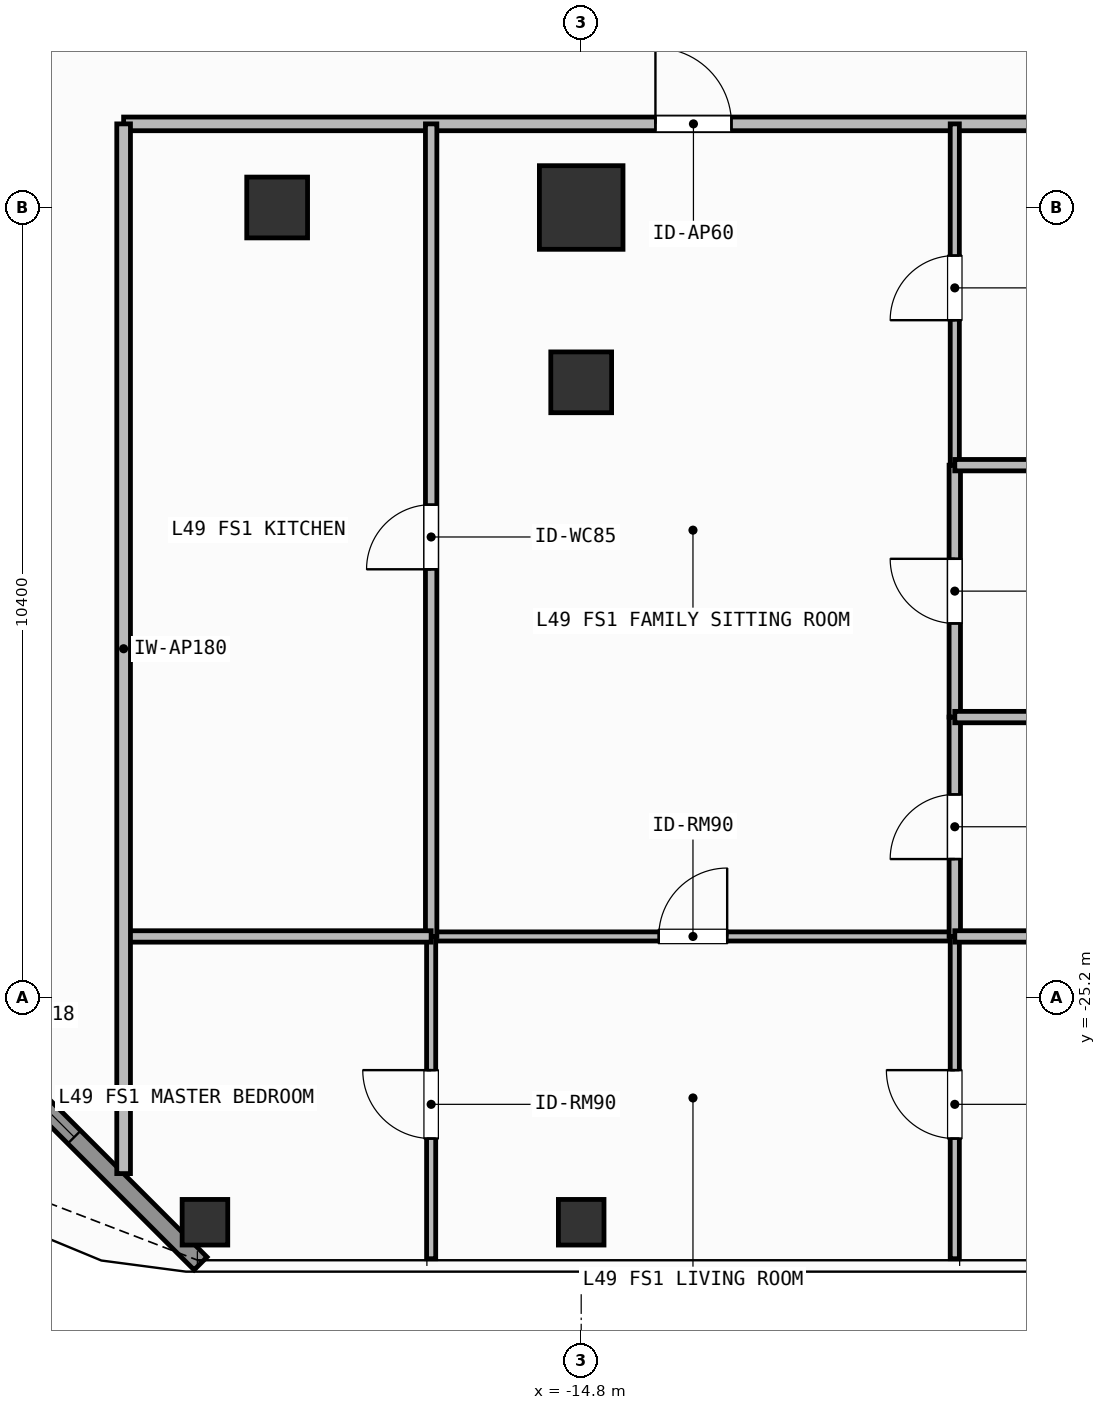
"""IFC4 building model, lengths in metres.
Left out: names, types, materials, properties, quantities, classifications, styles, units other than length and angle.
Written with IfcOpenShell. Run it as: python <this file> out.ifc"""

import sys

from ifc_helpers import new_model, si_unit, direction, frame, frame_2d, origin, origin_2d, place, context, subcontext, project, spatial, rectangle, hollow_rectangle, extrude, element, fill, save


model = new_model("IFC4")
c1 = context("Model", 3, precision=1e-05, world=origin(), true_north=direction((0.0, 1.0)))
c2 = subcontext(c1, "Body", "Model", "MODEL_VIEW")
j1 = project(units=[si_unit("LENGTHUNIT", "METRE"), si_unit("PLANEANGLEUNIT", "RADIAN")], contexts=[c1])
p1 = place(None, origin())
s1 = spatial("IfcSite", under=j1, at=p1, CompositionType="ELEMENT")
p2 = place(p1, origin())
s2 = spatial("IfcBuilding", under=s1, at=p2, CompositionType="ELEMENT")
p3 = place(p2, frame((0.0, 0.0, 199.2)))
s3 = spatial("IfcBuildingStorey", under=s2, at=p3, CompositionType="ELEMENT", Elevation=199.2)
p4 = place(p3, frame((-14.8, -14.8, 0.0), z_axis=(0.0, 0.0, 1.0), x_axis=(1.0, 0.0, 0.0)))
e1 = element("IfcColumn", 1, at=p4, inside=s3, PredefinedType="COLUMN", context=c2, shape_type="SweptSolid", body=[
    extrude(rectangle(XDim=1.1, YDim=1.1, at=origin_2d()), origin(), (0.0, 0.0, 1.0), 3.9),
])
for number, where, z_axis, x_axis in (
    (2, (-18.8, -14.8, 0.0), (0.0, 0.0, 1.0), (1.0, 0.0, 0.0)),
    (3, (-14.8, -17.1, 0.0), (0.0, 0.0, 1.0), (1.0, 0.0, 0.0)),
):
    element("IfcColumn", number, at=place(p3, frame(where, z_axis=z_axis, x_axis=x_axis)), inside=s3, PredefinedType="COLUMN", context=c2, shape_type="SweptSolid", body=[
        extrude(hollow_rectangle(XDim=0.8, YDim=0.8, WallThickness=0.036, at=origin_2d()), origin(), (0.0, 0.0, 1.0), 3.9),
    ])
for number, where, z_axis, x_axis in (
    (4, (-19.75, -28.15, 0.0), (0.0, 0.0, 1.0), (1.0, 0.0, 0.0)),
    (5, (-14.8, -28.15, 0.0), (0.0, 0.0, 1.0), (1.0, 0.0, 0.0)),
):
    element("IfcColumn", number, at=place(p3, frame(where, z_axis=z_axis, x_axis=x_axis)), inside=s3, PredefinedType="COLUMN", context=c2, shape_type="SweptSolid", body=[
        extrude(hollow_rectangle(XDim=0.6, YDim=0.6, WallThickness=0.028, at=origin_2d()), origin(), (0.0, 0.0, 1.0), 3.9),
    ])
p5 = place(p3, frame((-19.808, -28.692, 0.0), z_axis=(0.0, 0.0, 1.0), x_axis=(-0.707106781187, 0.707106781187, 0.0)))
e6 = element("IfcWall", 6, at=p5, inside=s3, PredefinedType="SOLIDWALL", context=c2, shape_type="SweptSolid", body=[
    extrude(rectangle(XDim=6.201, YDim=0.24, at=frame_2d((3.101, 0.0))), origin(), (0.0, 0.0, 1.0), 3.68),
])
p6 = place(p5, frame((2.351, 0.0, 0.8)))
e7 = element("IfcOpeningElement", 7, at=p6, cuts=e6, PredefinedType="OPENING", context=c2, shape_type="SweptSolid", body=[
    extrude(rectangle(XDim=1.5, YDim=1.85, at=frame_2d((0.75, 0.925))), frame((0.0, 0.13, 0.0), z_axis=(0.0, -1.0, 0.0), x_axis=(1.0, 0.0, 0.0)), (0.0, 0.0, 1.0), 0.26),
])
p7 = place(p3, frame((-20.82, -13.7, 0.0), z_axis=(0.0, 0.0, 1.0), x_axis=(1.0, 0.0, 0.0)))
e8 = element("IfcWall", 8, at=p7, inside=s3, PredefinedType="PARTITIONING", context=c2, shape_type="SweptSolid", body=[
    extrude(rectangle(XDim=15.893, YDim=0.18, at=frame_2d((7.947, 0.0))), origin(), (0.0, 0.0, 1.0), 3.68),
])
p8 = place(p7, frame((6.997, 0.0, 0.0)))
e9 = element("IfcOpeningElement", 9, at=p8, cuts=e8, PredefinedType="OPENING", context=c2, shape_type="SweptSolid", body=[
    extrude(rectangle(XDim=1.0, YDim=2.2, at=frame_2d((0.5, 1.1))), frame((0.0, 0.1, 0.0), z_axis=(0.0, -1.0, 0.0), x_axis=(1.0, 0.0, 0.0)), (0.0, 0.0, 1.0), 0.2),
])
p9 = place(p3, frame((-16.774, -24.39, 0.0), z_axis=(0.0, 0.0, 1.0), x_axis=(1.0, 0.0, 0.0)))
e10 = element("IfcWall", 10, at=p9, inside=s3, PredefinedType="PARTITIONING", context=c2, shape_type="SweptSolid", body=[
    extrude(rectangle(XDim=6.889, YDim=0.12, at=frame_2d((3.444, 0.0))), origin(), (0.0, 0.0, 1.0), 3.68),
])
p10 = place(p9, frame((2.994, 0.0, 0.0)))
e11 = element("IfcOpeningElement", 11, at=p10, cuts=e10, PredefinedType="OPENING", context=c2, shape_type="SweptSolid", body=[
    extrude(rectangle(XDim=0.9, YDim=2.1, at=frame_2d((0.45, 1.05))), frame((0.0, 0.07, 0.0), z_axis=(0.0, -1.0, 0.0), x_axis=(1.0, 0.0, 0.0)), (0.0, 0.0, 1.0), 0.14),
])
p11 = place(p3, frame((-16.774, -24.39, 0.0), z_axis=(0.0, 0.0, 1.0), x_axis=(0.0, 1.0, 0.0)))
e12 = element("IfcWall", 12, at=p11, inside=s3, PredefinedType="PARTITIONING", context=c2, shape_type="SweptSolid", body=[
    extrude(rectangle(XDim=10.69, YDim=0.15, at=frame_2d((5.345, 0.0))), origin(), (0.0, 0.0, 1.0), 3.68),
])
p12 = place(p11, frame((4.83, 0.0, 0.0)))
e13 = element("IfcOpeningElement", 13, at=p12, cuts=e12, PredefinedType="OPENING", context=c2, shape_type="SweptSolid", body=[
    extrude(rectangle(XDim=0.85, YDim=2.1, at=frame_2d((0.425, 1.05))), frame((0.0, 0.085, 0.0), z_axis=(0.0, -1.0, 0.0), x_axis=(1.0, 0.0, 0.0)), (0.0, 0.0, 1.0), 0.17),
])
p13 = place(p3, frame((-16.774, -28.63, 0.0), z_axis=(0.0, 0.0, 1.0), x_axis=(0.0, 1.0, 0.0)))
e14 = element("IfcWall", 14, at=p13, inside=s3, PredefinedType="PARTITIONING", context=c2, shape_type="SweptSolid", body=[
    extrude(rectangle(XDim=4.24, YDim=0.12, at=frame_2d((2.12, 0.0))), origin(), (0.0, 0.0, 1.0), 3.68),
])
p14 = place(p13, frame((1.581, 0.0, 0.0)))
e15 = element("IfcOpeningElement", 15, at=p14, cuts=e14, PredefinedType="OPENING", context=c2, shape_type="SweptSolid", body=[
    extrude(rectangle(XDim=0.9, YDim=2.1, at=frame_2d((0.45, 1.05))), frame((0.0, 0.07, 0.0), z_axis=(0.0, -1.0, 0.0), x_axis=(1.0, 0.0, 0.0)), (0.0, 0.0, 1.0), 0.14),
])
p15 = place(p3, frame((-9.885, -24.39, 0.0), z_axis=(0.0, 0.0, 1.0), x_axis=(0.0, 1.0, 0.0)))
e16 = element("IfcWall", 16, at=p15, inside=s3, PredefinedType="PARTITIONING", context=c2, shape_type="SweptSolid", body=[
    extrude(rectangle(XDim=2.886, YDim=0.15, at=frame_2d((1.443, 0.0))), origin(), (0.0, 0.0, 1.0), 3.68),
])
p16 = place(p15, frame((1.018, 0.0, 0.0)))
e17 = element("IfcOpeningElement", 17, at=p16, cuts=e16, PredefinedType="OPENING", context=c2, shape_type="SweptSolid", body=[
    extrude(rectangle(XDim=0.85, YDim=2.1, at=frame_2d((0.425, 1.05))), frame((0.0, 0.085, 0.0), z_axis=(0.0, -1.0, 0.0), x_axis=(1.0, 0.0, 0.0)), (0.0, 0.0, 1.0), 0.17),
])
p17 = place(p3, frame((-9.885, -21.504, 0.0), z_axis=(0.0, 0.0, 1.0), x_axis=(0.0, 1.0, 0.0)))
e18 = element("IfcWall", 18, at=p17, inside=s3, PredefinedType="PARTITIONING", context=c2, shape_type="SweptSolid", body=[
    extrude(rectangle(XDim=3.314, YDim=0.15, at=frame_2d((1.657, 0.0))), origin(), (0.0, 0.0, 1.0), 3.68),
])
p18 = place(p17, frame((1.232, 0.0, 0.0)))
e19 = element("IfcOpeningElement", 19, at=p18, cuts=e18, PredefinedType="OPENING", context=c2, shape_type="SweptSolid", body=[
    extrude(rectangle(XDim=0.85, YDim=2.1, at=frame_2d((0.425, 1.05))), frame((0.0, 0.085, 0.0), z_axis=(0.0, -1.0, 0.0), x_axis=(1.0, 0.0, 0.0)), (0.0, 0.0, 1.0), 0.17),
])
p19 = place(p3, frame((-9.885, -18.19, 0.0), z_axis=(0.0, 0.0, 1.0), x_axis=(0.0, 1.0, 0.0)))
e20 = element("IfcWall", 20, at=p19, inside=s3, PredefinedType="PARTITIONING", context=c2, shape_type="SweptSolid", body=[
    extrude(rectangle(XDim=4.49, YDim=0.12, at=frame_2d((2.245, 0.0))), origin(), (0.0, 0.0, 1.0), 3.68),
])
p20 = place(p19, frame((1.907, 0.0, 0.0)))
e21 = element("IfcOpeningElement", 21, at=p20, cuts=e20, PredefinedType="OPENING", context=c2, shape_type="SweptSolid", body=[
    extrude(rectangle(XDim=0.85, YDim=2.1, at=frame_2d((0.425, 1.05))), frame((0.0, 0.07, 0.0), z_axis=(0.0, -1.0, 0.0), x_axis=(1.0, 0.0, 0.0)), (0.0, 0.0, 1.0), 0.14),
])
p21 = place(p3, frame((-9.885, -28.63, 0.0), z_axis=(0.0, 0.0, 1.0), x_axis=(0.0, 1.0, 0.0)))
e22 = element("IfcWall", 22, at=p21, inside=s3, PredefinedType="PARTITIONING", context=c2, shape_type="SweptSolid", body=[
    extrude(rectangle(XDim=4.24, YDim=0.12, at=frame_2d((2.12, 0.0))), origin(), (0.0, 0.0, 1.0), 3.68),
])
p22 = place(p21, frame((1.581, 0.0, 0.0)))
e23 = element("IfcOpeningElement", 23, at=p22, cuts=e22, PredefinedType="OPENING", context=c2, shape_type="SweptSolid", body=[
    extrude(rectangle(XDim=0.9, YDim=2.1, at=frame_2d((0.45, 1.05))), frame((0.0, 0.07, 0.0), z_axis=(0.0, -1.0, 0.0), x_axis=(1.0, 0.0, 0.0)), (0.0, 0.0, 1.0), 0.14),
])
p23 = place(p3, frame((-20.82, -24.39, 0.0), z_axis=(0.0, 0.0, 1.0), x_axis=(1.0, 0.0, 0.0)))
e24 = element("IfcWall", 24, at=p23, inside=s3, PredefinedType="PARTITIONING", context=c2, shape_type="SweptSolid", body=[
    extrude(rectangle(XDim=4.046, YDim=0.15, at=frame_2d((2.023, 0.0))), origin(), (0.0, 0.0, 1.0), 3.68),
])
for number, where, z_axis, x_axis in (
    (25, (-9.885, -21.504, 0.0), (0.0, 0.0, 1.0), (1.0, 0.0, 0.0)),
    (26, (-9.885, -18.19, 0.0), (0.0, 0.0, 1.0), (1.0, 0.0, 0.0)),
    (27, (-9.885, -24.39, 0.0), (0.0, 0.0, 1.0), (1.0, 0.0, 0.0)),
):
    element("IfcWall", number, at=place(p3, frame(where, z_axis=z_axis, x_axis=x_axis)), inside=s3, PredefinedType="PARTITIONING", context=c2, shape_type="SweptSolid", body=[
        extrude(rectangle(XDim=4.958, YDim=0.15, at=frame_2d((2.479, 0.0))), origin(), (0.0, 0.0, 1.0), 3.68),
    ])
p24 = place(p3, frame((-20.82, -27.51, 0.0), z_axis=(0.0, 0.0, 1.0), x_axis=(0.0, 1.0, 0.0)))
e28 = element("IfcWall", 28, at=p24, inside=s3, PredefinedType="PARTITIONING", context=c2, shape_type="SweptSolid", body=[
    extrude(rectangle(XDim=13.81, YDim=0.18, at=frame_2d((6.905, 0.0))), origin(), (0.0, 0.0, 1.0), 3.68),
])
p25 = place(p6, origin())
e29 = element("IfcWindow", 29, at=p25, inside=s3, PartitioningType="SINGLE_PANEL", PredefinedType="WINDOW", context=c2, shape_type="SweptSolid", body=[
    extrude(rectangle(XDim=1.5, YDim=1.85, at=frame_2d((0.75, 0.925))), frame((0.0, 0.03, 0.0), z_axis=(0.0, -1.0, 0.0), x_axis=(1.0, 0.0, 0.0)), (0.0, 0.0, 1.0), 0.06),
])
fill(e7, e29)
p26 = place(p8, origin())
e30 = element("IfcDoor", 30, at=p26, inside=s3, OperationType="SINGLE_SWING_LEFT", PredefinedType="DOOR", context=c2, shape_type="SweptSolid", body=[
    extrude(rectangle(XDim=1.0, YDim=2.2, at=frame_2d((0.5, 1.1))), frame((0.0, 0.025, 0.0), z_axis=(0.0, -1.0, 0.0), x_axis=(1.0, 0.0, 0.0)), (0.0, 0.0, 1.0), 0.05),
])
fill(e9, e30)
p27 = place(p10, origin())
e31 = element("IfcDoor", 31, at=p27, inside=s3, OperationType="SINGLE_SWING_RIGHT", PredefinedType="DOOR", context=c2, shape_type="SweptSolid", body=[
    extrude(rectangle(XDim=0.9, YDim=2.1, at=frame_2d((0.45, 1.05))), frame((0.0, 0.025, 0.0), z_axis=(0.0, -1.0, 0.0), x_axis=(1.0, 0.0, 0.0)), (0.0, 0.0, 1.0), 0.05),
])
fill(e11, e31)
p28 = place(p12, origin())
e32 = element("IfcDoor", 32, at=p28, inside=s3, OperationType="SINGLE_SWING_LEFT", PredefinedType="DOOR", context=c2, shape_type="SweptSolid", body=[
    extrude(rectangle(XDim=0.85, YDim=2.1, at=frame_2d((0.425, 1.05))), frame((0.0, 0.025, 0.0), z_axis=(0.0, -1.0, 0.0), x_axis=(1.0, 0.0, 0.0)), (0.0, 0.0, 1.0), 0.05),
])
fill(e13, e32)
p29 = place(p14, origin())
e33 = element("IfcDoor", 33, at=p29, inside=s3, OperationType="SINGLE_SWING_RIGHT", PredefinedType="DOOR", context=c2, shape_type="SweptSolid", body=[
    extrude(rectangle(XDim=0.9, YDim=2.1, at=frame_2d((0.45, 1.05))), frame((0.0, 0.025, 0.0), z_axis=(0.0, -1.0, 0.0), x_axis=(1.0, 0.0, 0.0)), (0.0, 0.0, 1.0), 0.05),
])
fill(e15, e33)
p30 = place(p16, origin())
e34 = element("IfcDoor", 34, at=p30, inside=s3, OperationType="SINGLE_SWING_LEFT", PredefinedType="DOOR", context=c2, shape_type="SweptSolid", body=[
    extrude(rectangle(XDim=0.85, YDim=2.1, at=frame_2d((0.425, 1.05))), frame((0.0, 0.025, 0.0), z_axis=(0.0, -1.0, 0.0), x_axis=(1.0, 0.0, 0.0)), (0.0, 0.0, 1.0), 0.05),
])
fill(e17, e34)
p31 = place(p18, origin())
e35 = element("IfcDoor", 35, at=p31, inside=s3, OperationType="SINGLE_SWING_RIGHT", PredefinedType="DOOR", context=c2, shape_type="SweptSolid", body=[
    extrude(rectangle(XDim=0.85, YDim=2.1, at=frame_2d((0.425, 1.05))), frame((0.0, 0.025, 0.0), z_axis=(0.0, -1.0, 0.0), x_axis=(1.0, 0.0, 0.0)), (0.0, 0.0, 1.0), 0.05),
])
fill(e19, e35)
p32 = place(p20, origin())
e36 = element("IfcDoor", 36, at=p32, inside=s3, OperationType="SINGLE_SWING_LEFT", PredefinedType="DOOR", context=c2, shape_type="SweptSolid", body=[
    extrude(rectangle(XDim=0.85, YDim=2.1, at=frame_2d((0.425, 1.05))), frame((0.0, 0.025, 0.0), z_axis=(0.0, -1.0, 0.0), x_axis=(1.0, 0.0, 0.0)), (0.0, 0.0, 1.0), 0.05),
])
fill(e21, e36)
p33 = place(p22, origin())
e37 = element("IfcDoor", 37, at=p33, inside=s3, OperationType="SINGLE_SWING_RIGHT", PredefinedType="DOOR", context=c2, shape_type="SweptSolid", body=[
    extrude(rectangle(XDim=0.9, YDim=2.1, at=frame_2d((0.45, 1.05))), frame((0.0, 0.025, 0.0), z_axis=(0.0, -1.0, 0.0), x_axis=(1.0, 0.0, 0.0)), (0.0, 0.0, 1.0), 0.05),
])
fill(e23, e37)
save(model, sys.argv[1])
